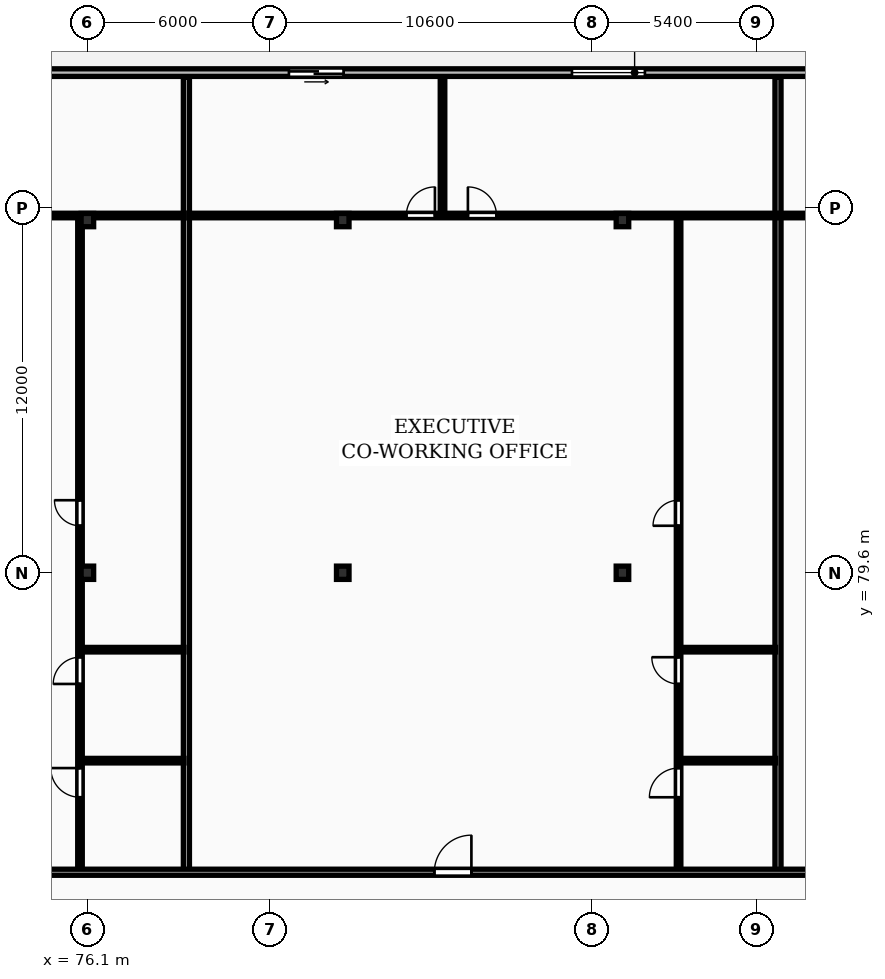
"""IFC4 building model, lengths in metres.
Left out: names, types, materials, properties, quantities, classifications, styles, units other than length and angle.
Written with IfcOpenShell. Run it as: python <this file> out.ifc"""

import sys

from ifc_helpers import new_model, si_unit, direction, frame, frame_2d, origin, origin_2d, place, context, subcontext, project, spatial, rectangle, i_section, extrude, element, fill, save


model = new_model("IFC4")
c1 = context("Model", 3, precision=1e-05, world=origin(), true_north=direction((0.0, 1.0)))
c2 = subcontext(c1, "Body", "Model", "MODEL_VIEW")
j1 = project(units=[si_unit("LENGTHUNIT", "METRE"), si_unit("PLANEANGLEUNIT", "RADIAN")], contexts=[c1])
p1 = place(None, origin())
s1 = spatial("IfcSite", under=j1, at=p1, CompositionType="ELEMENT")
p2 = place(p1, origin())
s2 = spatial("IfcBuilding", under=s1, at=p2, CompositionType="ELEMENT")
p3 = place(p2, frame((0.0, 0.0, 150.1)))
s3 = spatial("IfcBuildingStorey", under=s2, at=p3, CompositionType="ELEMENT", Elevation=150.1)
for number, where, z_axis, x_axis in (
    (1, (76.1, 79.6, 0.0), (0.0, 0.0, 1.0), (1.0, 0.0, 0.0)),
    (2, (76.1, 91.2, 0.0), (0.0, 0.0, 1.0), (1.0, 0.0, 0.0)),
    (3, (84.5, 79.6, 0.0), (0.0, 0.0, 1.0), (1.0, 0.0, 0.0)),
    (4, (84.5, 91.2, 0.0), (0.0, 0.0, 1.0), (1.0, 0.0, 0.0)),
    (5, (93.7, 79.6, 0.0), (0.0, 0.0, 1.0), (1.0, 0.0, 0.0)),
    (6, (93.7, 91.2, 0.0), (0.0, 0.0, 1.0), (1.0, 0.0, 0.0)),
):
    element("IfcColumn", number, at=place(p3, frame(where, z_axis=z_axis, x_axis=x_axis)), inside=s3, PredefinedType="COLUMN", context=c2, shape_type="SweptSolid", body=[
        extrude(i_section(OverallWidth=0.412, OverallDepth=0.437, WebThickness=0.036, FlangeThickness=0.052, FilletRadius=0.015, at=origin_2d()), origin(), (0.0, 0.0, 1.0), 3.6),
    ])
p4 = place(p3, frame((130.6, 96.05, 0.0), z_axis=(0.0, 0.0, 1.0), x_axis=(-1.0, 0.0, 0.0)))
e7 = element("IfcWall", 7, at=p4, inside=s3, PredefinedType="STANDARD", context=c2, shape_type="SweptSolid", body=[
    extrude(rectangle(XDim=73.0, YDim=0.25, at=frame_2d((36.5, 0.0))), origin(), (0.0, 0.0, 1.0), 3.31),
])
p5 = place(p4, frame((67.311, 0.0, 0.0)))
e8 = element("IfcOpeningElement", 8, at=p5, cuts=e7, PredefinedType="OPENING", context=c2, shape_type="SweptSolid", body=[
    extrude(rectangle(XDim=1.8, YDim=2.2, at=frame_2d((0.9, 1.1))), frame((0.0, 0.135, 0.0), z_axis=(0.0, -1.0, 0.0), x_axis=(1.0, 0.0, 0.0)), (0.0, 0.0, 1.0), 0.27),
])
p6 = place(p4, frame((56.252, 0.0, 0.85)))
e9 = element("IfcOpeningElement", 9, at=p6, cuts=e7, PredefinedType="OPENING", context=c2, shape_type="SweptSolid", body=[
    extrude(rectangle(XDim=2.4, YDim=1.9, at=frame_2d((1.2, 0.95))), frame((0.0, 0.135, 0.0), z_axis=(0.0, -1.0, 0.0), x_axis=(1.0, 0.0, 0.0)), (0.0, 0.0, 1.0), 0.27),
])
p7 = place(p4, frame((46.071, 0.0, 0.0)))
e10 = element("IfcOpeningElement", 10, at=p7, cuts=e7, PredefinedType="OPENING", context=c2, shape_type="SweptSolid", body=[
    extrude(rectangle(XDim=1.8, YDim=2.2, at=frame_2d((0.9, 1.1))), frame((0.0, 0.135, 0.0), z_axis=(0.0, -1.0, 0.0), x_axis=(1.0, 0.0, 0.0)), (0.0, 0.0, 1.0), 0.27),
])
p8 = place(p4, frame((36.161, 0.0, 0.85)))
e11 = element("IfcOpeningElement", 11, at=p8, cuts=e7, PredefinedType="OPENING", context=c2, shape_type="SweptSolid", body=[
    extrude(rectangle(XDim=2.4, YDim=1.9, at=frame_2d((1.2, 0.95))), frame((0.0, 0.135, 0.0), z_axis=(0.0, -1.0, 0.0), x_axis=(1.0, 0.0, 0.0)), (0.0, 0.0, 1.0), 0.27),
])
p9 = place(p4, frame((26.569, 0.0, 0.0)))
e12 = element("IfcOpeningElement", 12, at=p9, cuts=e7, PredefinedType="OPENING", context=c2, shape_type="SweptSolid", body=[
    extrude(rectangle(XDim=1.8, YDim=2.2, at=frame_2d((0.9, 1.1))), frame((0.0, 0.135, 0.0), z_axis=(0.0, -1.0, 0.0), x_axis=(1.0, 0.0, 0.0)), (0.0, 0.0, 1.0), 0.27),
])
p10 = place(p4, frame((16.458, 0.0, 0.85)))
e13 = element("IfcOpeningElement", 13, at=p10, cuts=e7, PredefinedType="OPENING", context=c2, shape_type="SweptSolid", body=[
    extrude(rectangle(XDim=2.4, YDim=1.9, at=frame_2d((1.2, 0.95))), frame((0.0, 0.135, 0.0), z_axis=(0.0, -1.0, 0.0), x_axis=(1.0, 0.0, 0.0)), (0.0, 0.0, 1.0), 0.27),
])
p11 = place(p4, frame((7.042, 0.0, 0.0)))
e14 = element("IfcOpeningElement", 14, at=p11, cuts=e7, PredefinedType="OPENING", context=c2, shape_type="SweptSolid", body=[
    extrude(rectangle(XDim=1.8, YDim=2.2, at=frame_2d((0.9, 1.1))), frame((0.0, 0.135, 0.0), z_axis=(0.0, -1.0, 0.0), x_axis=(1.0, 0.0, 0.0)), (0.0, 0.0, 1.0), 0.27),
])
p12 = place(p4, frame((0.9, 0.0, 0.85)))
e15 = element("IfcOpeningElement", 15, at=p12, cuts=e7, PredefinedType="OPENING", context=c2, shape_type="SweptSolid", body=[
    extrude(rectangle(XDim=2.4, YDim=1.9, at=frame_2d((1.2, 0.95))), frame((0.0, 0.135, 0.0), z_axis=(0.0, -1.0, 0.0), x_axis=(1.0, 0.0, 0.0)), (0.0, 0.0, 1.0), 0.27),
])
p13 = place(p3, frame((79.357, 69.83, 0.0), z_axis=(0.0, 0.0, 1.0), x_axis=(0.0, 1.0, 0.0)))
e16 = element("IfcWall", 16, at=p13, inside=s3, PredefinedType="PARTITIONING", context=c2, shape_type="SweptSolid", body=[
    extrude(rectangle(XDim=26.07, YDim=0.2, at=frame_2d((13.035, 0.0))), origin(), (0.0, 0.0, 1.0), 3.31),
])
for number, where, z_axis, x_axis in (
    (17, (75.917, 73.42, 0.0), (0.0, 0.0, 1.0), (1.0, 0.0, 0.0)),
    (18, (75.917, 77.07, 0.0), (0.0, 0.0, 1.0), (1.0, 0.0, 0.0)),
):
    element("IfcWall", number, at=place(p3, frame(where, z_axis=z_axis, x_axis=x_axis)), inside=s3, PredefinedType="PARTITIONING", context=c2, shape_type="SweptSolid", body=[
        extrude(rectangle(XDim=3.36, YDim=0.15, at=frame_2d((1.68, 0.0))), origin(), (0.0, 0.0, 1.0), 3.31),
    ])
p14 = place(p3, frame((75.857, 69.81, 0.0), z_axis=(0.0, 0.0, 1.0), x_axis=(0.0, 1.0, 0.0)))
e19 = element("IfcWall", 19, at=p14, inside=s3, PredefinedType="PARTITIONING", context=c2, shape_type="SweptSolid", body=[
    extrude(rectangle(XDim=21.48, YDim=0.15, at=frame_2d((10.74, 0.0))), origin(), (0.0, 0.0, 1.0), 2.617),
])
p15 = place(p14, frame((2.406, 0.0, 0.0)))
e20 = element("IfcOpeningElement", 20, at=p15, cuts=e19, PredefinedType="OPENING", context=c2, shape_type="SweptSolid", body=[
    extrude(rectangle(XDim=0.96, YDim=2.1, at=frame_2d((0.48, 1.05))), frame((0.0, 0.085, 0.0), z_axis=(0.0, -1.0, 0.0), x_axis=(1.0, 0.0, 0.0)), (0.0, 0.0, 1.0), 0.17),
])
p16 = place(p14, frame((6.133, 0.0, 0.0)))
e21 = element("IfcOpeningElement", 21, at=p16, cuts=e19, PredefinedType="OPENING", context=c2, shape_type="SweptSolid", body=[
    extrude(rectangle(XDim=0.88, YDim=2.06, at=frame_2d((0.44, 1.03))), frame((0.0, 0.085, 0.0), z_axis=(0.0, -1.0, 0.0), x_axis=(1.0, 0.0, 0.0)), (0.0, 0.0, 1.0), 0.17),
])
p17 = place(p14, frame((11.336, 0.0, 0.0)))
e22 = element("IfcOpeningElement", 22, at=p17, cuts=e19, PredefinedType="OPENING", context=c2, shape_type="SweptSolid", body=[
    extrude(rectangle(XDim=0.84, YDim=2.04, at=frame_2d((0.42, 1.02))), frame((0.0, 0.085, 0.0), z_axis=(0.0, -1.0, 0.0), x_axis=(1.0, 0.0, 0.0)), (0.0, 0.0, 1.0), 0.17),
])
p18 = place(p3, frame((57.68, 91.35, 0.0), z_axis=(0.0, 0.0, 1.0), x_axis=(1.0, 0.0, 0.0)))
e23 = element("IfcWall", 23, at=p18, inside=s3, PredefinedType="PARTITIONING", context=c2, shape_type="SweptSolid", body=[
    extrude(rectangle(XDim=21.597, YDim=0.15, at=frame_2d((10.799, 0.0))), origin(), (0.0, 0.0, 1.0), 3.003),
])
p19 = place(p18, frame((7.89, 0.0, 0.0)))
e24 = element("IfcOpeningElement", 24, at=p19, cuts=e23, PredefinedType="OPENING", context=c2, shape_type="SweptSolid", body=[
    extrude(rectangle(XDim=0.92, YDim=2.08, at=frame_2d((0.46, 1.04))), frame((0.0, 0.085, 0.0), z_axis=(0.0, -1.0, 0.0), x_axis=(1.0, 0.0, 0.0)), (0.0, 0.0, 1.0), 0.17),
])
p20 = place(p18, frame((11.842, 0.0, 0.0)))
e25 = element("IfcOpeningElement", 25, at=p20, cuts=e23, PredefinedType="OPENING", context=c2, shape_type="SweptSolid", body=[
    extrude(rectangle(XDim=0.92, YDim=2.08, at=frame_2d((0.46, 1.04))), frame((0.0, 0.085, 0.0), z_axis=(0.0, -1.0, 0.0), x_axis=(1.0, 0.0, 0.0)), (0.0, 0.0, 1.0), 0.17),
])
p21 = place(p3, frame((98.816, 69.83, 0.0), z_axis=(0.0, 0.0, 1.0), x_axis=(0.0, 1.0, 0.0)))
e26 = element("IfcWall", 26, at=p21, inside=s3, PredefinedType="PARTITIONING", context=c2, shape_type="SweptSolid", body=[
    extrude(rectangle(XDim=26.07, YDim=0.2, at=frame_2d((13.035, 0.0))), origin(), (0.0, 0.0, 1.0), 3.31),
])
for number, where, z_axis, x_axis in (
    (27, (95.606, 73.42, 0.0), (0.0, 0.0, 1.0), (1.0, 0.0, 0.0)),
    (28, (95.606, 77.07, 0.0), (0.0, 0.0, 1.0), (1.0, 0.0, 0.0)),
):
    element("IfcWall", number, at=place(p3, frame(where, z_axis=z_axis, x_axis=x_axis)), inside=s3, PredefinedType="PARTITIONING", context=c2, shape_type="SweptSolid", body=[
        extrude(rectangle(XDim=3.13, YDim=0.15, at=frame_2d((1.565, 0.0))), origin(), (0.0, 0.0, 1.0), 3.31),
    ])
p22 = place(p3, frame((95.546, 69.81, 0.0), z_axis=(0.0, 0.0, 1.0), x_axis=(0.0, 1.0, 0.0)))
e29 = element("IfcWall", 29, at=p22, inside=s3, PredefinedType="PARTITIONING", context=c2, shape_type="SweptSolid", body=[
    extrude(rectangle(XDim=21.48, YDim=0.15, at=frame_2d((10.74, 0.0))), origin(), (0.0, 0.0, 1.0), 3.31),
])
p23 = place(p22, frame((2.406, 0.0, 0.0)))
e30 = element("IfcOpeningElement", 30, at=p23, cuts=e29, PredefinedType="OPENING", context=c2, shape_type="SweptSolid", body=[
    extrude(rectangle(XDim=0.96, YDim=2.1, at=frame_2d((0.48, 1.05))), frame((0.0, 0.085, 0.0), z_axis=(0.0, -1.0, 0.0), x_axis=(1.0, 0.0, 0.0)), (0.0, 0.0, 1.0), 0.17),
])
p24 = place(p22, frame((6.133, 0.0, 0.0)))
e31 = element("IfcOpeningElement", 31, at=p24, cuts=e29, PredefinedType="OPENING", context=c2, shape_type="SweptSolid", body=[
    extrude(rectangle(XDim=0.88, YDim=2.06, at=frame_2d((0.44, 1.03))), frame((0.0, 0.085, 0.0), z_axis=(0.0, -1.0, 0.0), x_axis=(1.0, 0.0, 0.0)), (0.0, 0.0, 1.0), 0.17),
])
p25 = place(p22, frame((11.336, 0.0, 0.0)))
e32 = element("IfcOpeningElement", 32, at=p25, cuts=e29, PredefinedType="OPENING", context=c2, shape_type="SweptSolid", body=[
    extrude(rectangle(XDim=0.84, YDim=2.04, at=frame_2d((0.42, 1.02))), frame((0.0, 0.085, 0.0), z_axis=(0.0, -1.0, 0.0), x_axis=(1.0, 0.0, 0.0)), (0.0, 0.0, 1.0), 0.17),
])
p26 = place(p3, frame((87.781, 91.43, 0.0), z_axis=(0.0, 0.0, 1.0), x_axis=(0.0, 1.0, 0.0)))
e33 = element("IfcWall", 33, at=p26, inside=s3, PredefinedType="PARTITIONING", context=c2, shape_type="SweptSolid", body=[
    extrude(rectangle(XDim=4.47, YDim=0.15, at=frame_2d((2.235, 0.0))), origin(), (0.0, 0.0, 1.0), 3.31),
])
p27 = place(p3, frame((79.437, 91.35, 0.0), z_axis=(0.0, 0.0, 1.0), x_axis=(1.0, 0.0, 0.0)))
e34 = element("IfcWall", 34, at=p27, inside=s3, PredefinedType="PARTITIONING", context=c2, shape_type="SweptSolid", body=[
    extrude(rectangle(XDim=19.299, YDim=0.15, at=frame_2d((9.649, 0.0))), origin(), (0.0, 0.0, 1.0), 3.003),
])
p28 = place(p27, frame((7.155, 0.0, 0.0)))
e35 = element("IfcOpeningElement", 35, at=p28, cuts=e34, PredefinedType="OPENING", context=c2, shape_type="SweptSolid", body=[
    extrude(rectangle(XDim=0.94, YDim=2.1, at=frame_2d((0.47, 1.05))), frame((0.0, 0.085, 0.0), z_axis=(0.0, -1.0, 0.0), x_axis=(1.0, 0.0, 0.0)), (0.0, 0.0, 1.0), 0.17),
])
p29 = place(p27, frame((9.179, 0.0, 0.0)))
e36 = element("IfcOpeningElement", 36, at=p29, cuts=e34, PredefinedType="OPENING", context=c2, shape_type="SweptSolid", body=[
    extrude(rectangle(XDim=0.94, YDim=2.1, at=frame_2d((0.47, 1.05))), frame((0.0, 0.085, 0.0), z_axis=(0.0, -1.0, 0.0), x_axis=(1.0, 0.0, 0.0)), (0.0, 0.0, 1.0), 0.17),
])
p30 = place(p3, frame((98.896, 91.35, 0.0), z_axis=(0.0, 0.0, 1.0), x_axis=(1.0, 0.0, 0.0)))
e37 = element("IfcWall", 37, at=p30, inside=s3, PredefinedType="PARTITIONING", context=c2, shape_type="SweptSolid", body=[
    extrude(rectangle(XDim=19.701, YDim=0.15, at=frame_2d((9.851, 0.0))), origin(), (0.0, 0.0, 1.0), 3.003),
])
p31 = place(p30, frame((7.24, 0.0, 0.0)))
e38 = element("IfcOpeningElement", 38, at=p31, cuts=e37, PredefinedType="OPENING", context=c2, shape_type="SweptSolid", body=[
    extrude(rectangle(XDim=0.94, YDim=2.1, at=frame_2d((0.47, 1.05))), frame((0.0, 0.085, 0.0), z_axis=(0.0, -1.0, 0.0), x_axis=(1.0, 0.0, 0.0)), (0.0, 0.0, 1.0), 0.17),
])
p32 = place(p30, frame((9.381, 0.0, 0.0)))
e39 = element("IfcOpeningElement", 39, at=p32, cuts=e37, PredefinedType="OPENING", context=c2, shape_type="SweptSolid", body=[
    extrude(rectangle(XDim=0.94, YDim=2.1, at=frame_2d((0.47, 1.05))), frame((0.0, 0.085, 0.0), z_axis=(0.0, -1.0, 0.0), x_axis=(1.0, 0.0, 0.0)), (0.0, 0.0, 1.0), 0.17),
])
p33 = place(p3, frame((57.6, 69.75, 0.0), z_axis=(0.0, 0.0, 1.0), x_axis=(1.0, 0.0, 0.0)))
e40 = element("IfcWall", 40, at=p33, inside=s3, PredefinedType="PARTITIONING", context=c2, shape_type="SweptSolid", body=[
    extrude(rectangle(XDim=73.0, YDim=0.2, at=frame_2d((36.5, 0.0))), origin(), (0.0, 0.0, 1.0), 3.31),
])
p34 = place(p33, frame((9.189, 0.0, 0.0)))
e41 = element("IfcOpeningElement", 41, at=p34, cuts=e40, PredefinedType="OPENING", context=c2, shape_type="SweptSolid", body=[
    extrude(rectangle(XDim=1.22, YDim=2.18, at=frame_2d((0.61, 1.09))), frame((0.0, 0.11, 0.0), z_axis=(0.0, -1.0, 0.0), x_axis=(1.0, 0.0, 0.0)), (0.0, 0.0, 1.0), 0.22),
])
p35 = place(p33, frame((29.912, 0.0, 0.0)))
e42 = element("IfcOpeningElement", 42, at=p35, cuts=e40, PredefinedType="OPENING", context=c2, shape_type="SweptSolid", body=[
    extrude(rectangle(XDim=1.22, YDim=2.18, at=frame_2d((0.61, 1.09))), frame((0.0, 0.11, 0.0), z_axis=(0.0, -1.0, 0.0), x_axis=(1.0, 0.0, 0.0)), (0.0, 0.0, 1.0), 0.22),
])
p36 = place(p33, frame((49.457, 0.0, 0.0)))
e43 = element("IfcOpeningElement", 43, at=p36, cuts=e40, PredefinedType="OPENING", context=c2, shape_type="SweptSolid", body=[
    extrude(rectangle(XDim=1.22, YDim=2.18, at=frame_2d((0.61, 1.09))), frame((0.0, 0.11, 0.0), z_axis=(0.0, -1.0, 0.0), x_axis=(1.0, 0.0, 0.0)), (0.0, 0.0, 1.0), 0.22),
])
p37 = place(p33, frame((63.122, 0.0, 0.0)))
e44 = element("IfcOpeningElement", 44, at=p37, cuts=e40, PredefinedType="OPENING", context=c2, shape_type="SweptSolid", body=[
    extrude(rectangle(XDim=0.95, YDim=2.15, at=frame_2d((0.475, 1.075))), frame((0.0, 0.11, 0.0), z_axis=(0.0, -1.0, 0.0), x_axis=(1.0, 0.0, 0.0)), (0.0, 0.0, 1.0), 0.22),
])
p38 = place(p7, origin())
e45 = element("IfcDoor", 45, at=p38, inside=s3, OperationType="SLIDING_TO_LEFT", PredefinedType="DOOR", context=c2, shape_type="SweptSolid", body=[
    extrude(rectangle(XDim=1.8, YDim=2.2, at=frame_2d((0.9, 1.1))), frame((0.0, 0.025, 0.0), z_axis=(0.0, -1.0, 0.0), x_axis=(1.0, 0.0, 0.0)), (0.0, 0.0, 1.0), 0.05),
])
fill(e10, e45)
p39 = place(p8, origin())
e46 = element("IfcWindow", 46, at=p39, inside=s3, PartitioningType="DOUBLE_PANEL_VERTICAL", PredefinedType="WINDOW", context=c2, shape_type="SweptSolid", body=[
    extrude(rectangle(XDim=2.4, YDim=1.9, at=frame_2d((1.2, 0.95))), frame((0.0, 0.03, 0.0), z_axis=(0.0, -1.0, 0.0), x_axis=(1.0, 0.0, 0.0)), (0.0, 0.0, 1.0), 0.06),
])
fill(e11, e46)
p40 = place(p15, origin())
e47 = element("IfcDoor", 47, at=p40, inside=s3, OperationType="SINGLE_SWING_RIGHT", PredefinedType="DOOR", context=c2, shape_type="SweptSolid", body=[
    extrude(rectangle(XDim=0.96, YDim=2.1, at=frame_2d((0.48, 1.05))), frame((0.0, 0.025, 0.0), z_axis=(0.0, -1.0, 0.0), x_axis=(1.0, 0.0, 0.0)), (0.0, 0.0, 1.0), 0.05),
])
fill(e20, e47)
p41 = place(p16, origin())
e48 = element("IfcDoor", 48, at=p41, inside=s3, OperationType="SINGLE_SWING_LEFT", PredefinedType="DOOR", context=c2, shape_type="SweptSolid", body=[
    extrude(rectangle(XDim=0.88, YDim=2.06, at=frame_2d((0.44, 1.03))), frame((0.0, 0.025, 0.0), z_axis=(0.0, -1.0, 0.0), x_axis=(1.0, 0.0, 0.0)), (0.0, 0.0, 1.0), 0.05),
])
fill(e21, e48)
p42 = place(p17, origin())
e49 = element("IfcDoor", 49, at=p42, inside=s3, OperationType="SINGLE_SWING_RIGHT", PredefinedType="DOOR", context=c2, shape_type="SweptSolid", body=[
    extrude(rectangle(XDim=0.84, YDim=2.04, at=frame_2d((0.42, 1.02))), frame((0.0, 0.025, 0.0), z_axis=(0.0, -1.0, 0.0), x_axis=(1.0, 0.0, 0.0)), (0.0, 0.0, 1.0), 0.05),
])
fill(e22, e49)
p43 = place(p23, origin())
e50 = element("IfcDoor", 50, at=p43, inside=s3, OperationType="SINGLE_SWING_LEFT", PredefinedType="DOOR", context=c2, shape_type="SweptSolid", body=[
    extrude(rectangle(XDim=0.96, YDim=2.1, at=frame_2d((0.48, 1.05))), frame((0.0, 0.025, 0.0), z_axis=(0.0, -1.0, 0.0), x_axis=(1.0, 0.0, 0.0)), (0.0, 0.0, 1.0), 0.05),
])
fill(e30, e50)
p44 = place(p24, origin())
e51 = element("IfcDoor", 51, at=p44, inside=s3, OperationType="SINGLE_SWING_RIGHT", PredefinedType="DOOR", context=c2, shape_type="SweptSolid", body=[
    extrude(rectangle(XDim=0.88, YDim=2.06, at=frame_2d((0.44, 1.03))), frame((0.0, 0.025, 0.0), z_axis=(0.0, -1.0, 0.0), x_axis=(1.0, 0.0, 0.0)), (0.0, 0.0, 1.0), 0.05),
])
fill(e31, e51)
p45 = place(p25, origin())
e52 = element("IfcDoor", 52, at=p45, inside=s3, OperationType="SINGLE_SWING_LEFT", PredefinedType="DOOR", context=c2, shape_type="SweptSolid", body=[
    extrude(rectangle(XDim=0.84, YDim=2.04, at=frame_2d((0.42, 1.02))), frame((0.0, 0.025, 0.0), z_axis=(0.0, -1.0, 0.0), x_axis=(1.0, 0.0, 0.0)), (0.0, 0.0, 1.0), 0.05),
])
fill(e32, e52)
p46 = place(p28, origin())
e53 = element("IfcDoor", 53, at=p46, inside=s3, OperationType="SINGLE_SWING_RIGHT", PredefinedType="DOOR", context=c2, shape_type="SweptSolid", body=[
    extrude(rectangle(XDim=0.94, YDim=2.1, at=frame_2d((0.47, 1.05))), frame((0.0, 0.025, 0.0), z_axis=(0.0, -1.0, 0.0), x_axis=(1.0, 0.0, 0.0)), (0.0, 0.0, 1.0), 0.05),
])
fill(e35, e53)
p47 = place(p29, origin())
e54 = element("IfcDoor", 54, at=p47, inside=s3, OperationType="SINGLE_SWING_LEFT", PredefinedType="DOOR", context=c2, shape_type="SweptSolid", body=[
    extrude(rectangle(XDim=0.94, YDim=2.1, at=frame_2d((0.47, 1.05))), frame((0.0, 0.025, 0.0), z_axis=(0.0, -1.0, 0.0), x_axis=(1.0, 0.0, 0.0)), (0.0, 0.0, 1.0), 0.05),
])
fill(e36, e54)
p48 = place(p35, origin())
e55 = element("IfcDoor", 55, at=p48, inside=s3, OperationType="SINGLE_SWING_RIGHT", PredefinedType="DOOR", context=c2, shape_type="SweptSolid", body=[
    extrude(rectangle(XDim=1.22, YDim=2.18, at=frame_2d((0.61, 1.09))), frame((0.0, 0.025, 0.0), z_axis=(0.0, -1.0, 0.0), x_axis=(1.0, 0.0, 0.0)), (0.0, 0.0, 1.0), 0.05),
])
fill(e42, e55)
save(model, sys.argv[1])
